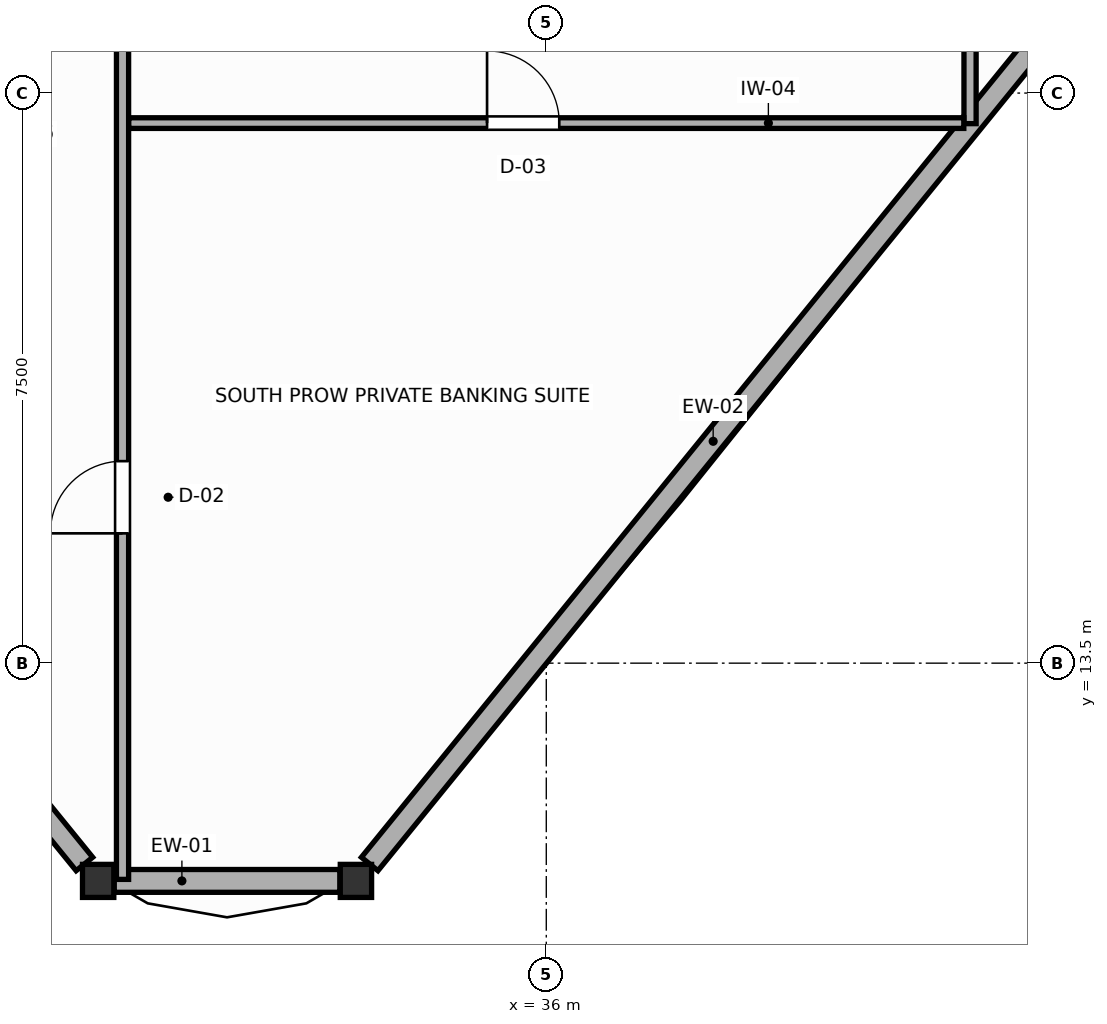
"""IFC4 building model, lengths in metres.
Left out: names, types, materials, properties, quantities, classifications, styles, units other than length and angle.
Written with IfcOpenShell. Run it as: python <this file> out.ifc"""

import sys

from ifc_helpers import new_model, si_unit, direction, frame, frame_2d, origin, origin_2d, place, context, subcontext, project, spatial, rectangle, i_section, extrude, source, transform, mapped, element, fill, save


model = new_model("IFC4")
c1 = context("Model", 3, precision=1e-05, world=origin(), true_north=direction((0.0, 1.0)))
c2 = subcontext(c1, "Body", "Model", "MODEL_VIEW")
j1 = project(units=[si_unit("LENGTHUNIT", "METRE"), si_unit("PLANEANGLEUNIT", "RADIAN")], contexts=[c1])
p1 = place(None, origin())
s1 = spatial("IfcSite", under=j1, at=p1, CompositionType="ELEMENT")
p2 = place(p1, origin())
s2 = spatial("IfcBuilding", under=s1, at=p2, CompositionType="ELEMENT")
p3 = place(p2, frame((0.0, 0.0, 165.0)))
s3 = spatial("IfcBuildingStorey", under=s2, at=p3, CompositionType="ELEMENT", Elevation=165.0)
m1 = source(origin(), c2, "Body", "SweptSolid", [
    extrude(i_section(OverallWidth=0.412, OverallDepth=0.435, WebThickness=0.033, FlangeThickness=0.053, FilletRadius=0.015, at=origin_2d()), origin(), (0.0, 0.0, 1.0), 3.6),
])
for number, where, z_axis, x_axis in (
    (1, (30.104, 10.635, 0.0), (0.0, 0.0, 1.0), (1.0, 0.0, 0.0)),
    (2, (33.496, 10.635, 0.0), (0.0, 0.0, 1.0), (1.0, 0.0, 0.0)),
):
    element("IfcColumn", number, at=place(p3, frame(where, z_axis=z_axis, x_axis=x_axis)), inside=s3, PredefinedType="COLUMN", context=c2, shape_type="MappedRepresentation", body=[
        mapped(m1, transform((0.0, 0.0, 0.0), scale=1.0)),
    ])
p4 = place(p3, frame((20.885, 21.98, 0.0), z_axis=(0.0, 0.0, 1.0), x_axis=(0.630659963665, -0.776059282678, 0.0)))
e3 = element("IfcWall", 3, at=p4, inside=s3, PredefinedType="SOLIDWALL", context=c2, shape_type="SweptSolid", body=[
    extrude(rectangle(XDim=14.331, YDim=0.28, at=frame_2d((7.166, 0.0))), origin(), (0.0, 0.0, 1.0), 1.84),
])
p5 = place(p3, frame((30.315, 10.635, 0.0), z_axis=(0.0, 0.0, 1.0), x_axis=(1.0, 0.0, 0.0)))
e4 = element("IfcWall", 4, at=p5, inside=s3, PredefinedType="SOLIDWALL", context=c2, shape_type="SweptSolid", body=[
    extrude(rectangle(XDim=2.969, YDim=0.3, at=frame_2d((1.485, 0.0))), origin(), (0.0, 0.0, 1.0), 1.84),
])
p6 = place(p3, frame((33.677, 10.858, 0.0), z_axis=(0.0, 0.0, 1.0), x_axis=(0.630649703469, 0.776067620452, 0.0)))
e5 = element("IfcWall", 5, at=p6, inside=s3, PredefinedType="SOLIDWALL", context=c2, shape_type="SweptSolid", body=[
    extrude(rectangle(XDim=14.331, YDim=0.28, at=frame_2d((7.166, 0.0))), origin(), (0.0, 0.0, 1.0), 1.84),
])
p7 = place(p3, frame((30.425, 10.655, 0.0), z_axis=(0.0, 0.0, 1.0), x_axis=(0.0, 1.0, 0.0)))
e6 = element("IfcWall", 6, at=p7, inside=s3, PredefinedType="PARTITIONING", context=c2, shape_type="SweptSolid", body=[
    extrude(rectangle(XDim=19.375, YDim=0.16, at=frame_2d((9.688, 0.0))), origin(), (0.0, 0.0, 1.0), 3.4),
])
p8 = place(p7, frame((4.552, 0.0, 0.0)))
e7 = element("IfcOpeningElement", 7, at=p8, cuts=e6, PredefinedType="OPENING", context=c2, shape_type="SweptSolid", body=[
    extrude(rectangle(XDim=0.95, YDim=2.05, at=frame_2d((0.475, 1.025))), frame((0.0, 0.09, 0.0), z_axis=(0.0, -1.0, 0.0), x_axis=(1.0, 0.0, 0.0)), (0.0, 0.0, 1.0), 0.18),
])
p9 = place(p3, frame((41.575, 20.598, 0.0), z_axis=(0.0, 0.0, 1.0), x_axis=(0.0, 1.0, 0.0)))
e8 = element("IfcWall", 8, at=p9, inside=s3, PredefinedType="PARTITIONING", context=c2, shape_type="SweptSolid", body=[
    extrude(rectangle(XDim=9.345, YDim=0.16, at=frame_2d((4.673, 0.0))), origin(), (0.0, 0.0, 1.0), 3.4),
])
p10 = place(p3, frame((30.507, 20.605, 0.0), z_axis=(0.0, 0.0, 1.0), x_axis=(1.0, 0.0, 0.0)))
e9 = element("IfcWall", 9, at=p10, inside=s3, PredefinedType="PARTITIONING", context=c2, shape_type="SweptSolid", body=[
    extrude(rectangle(XDim=10.986, YDim=0.14, at=frame_2d((5.493, 0.0))), origin(), (0.0, 0.0, 1.0), 3.4),
])
p11 = place(p10, frame((4.714, 0.0, 0.0)))
e10 = element("IfcOpeningElement", 10, at=p11, cuts=e9, PredefinedType="OPENING", context=c2, shape_type="SweptSolid", body=[
    extrude(rectangle(XDim=0.95, YDim=2.05, at=frame_2d((0.475, 1.025))), frame((0.0, 0.08, 0.0), z_axis=(0.0, -1.0, 0.0), x_axis=(1.0, 0.0, 0.0)), (0.0, 0.0, 1.0), 0.16),
])
p12 = place(p8, origin())
e11 = element("IfcDoor", 11, at=p12, inside=s3, OperationType="SINGLE_SWING_LEFT", PredefinedType="DOOR", context=c2, shape_type="SweptSolid", body=[
    extrude(rectangle(XDim=0.95, YDim=2.05, at=frame_2d((0.475, 1.025))), frame((0.0, 0.025, 0.0), z_axis=(0.0, -1.0, 0.0), x_axis=(1.0, 0.0, 0.0)), (0.0, 0.0, 1.0), 0.05),
])
fill(e7, e11)
p13 = place(p11, origin())
e12 = element("IfcDoor", 12, at=p13, inside=s3, OperationType="SINGLE_SWING_LEFT", PredefinedType="DOOR", context=c2, shape_type="SweptSolid", body=[
    extrude(rectangle(XDim=0.95, YDim=2.05, at=frame_2d((0.475, 1.025))), frame((0.0, 0.025, 0.0), z_axis=(0.0, -1.0, 0.0), x_axis=(1.0, 0.0, 0.0)), (0.0, 0.0, 1.0), 0.05),
])
fill(e10, e12)
save(model, sys.argv[1])
